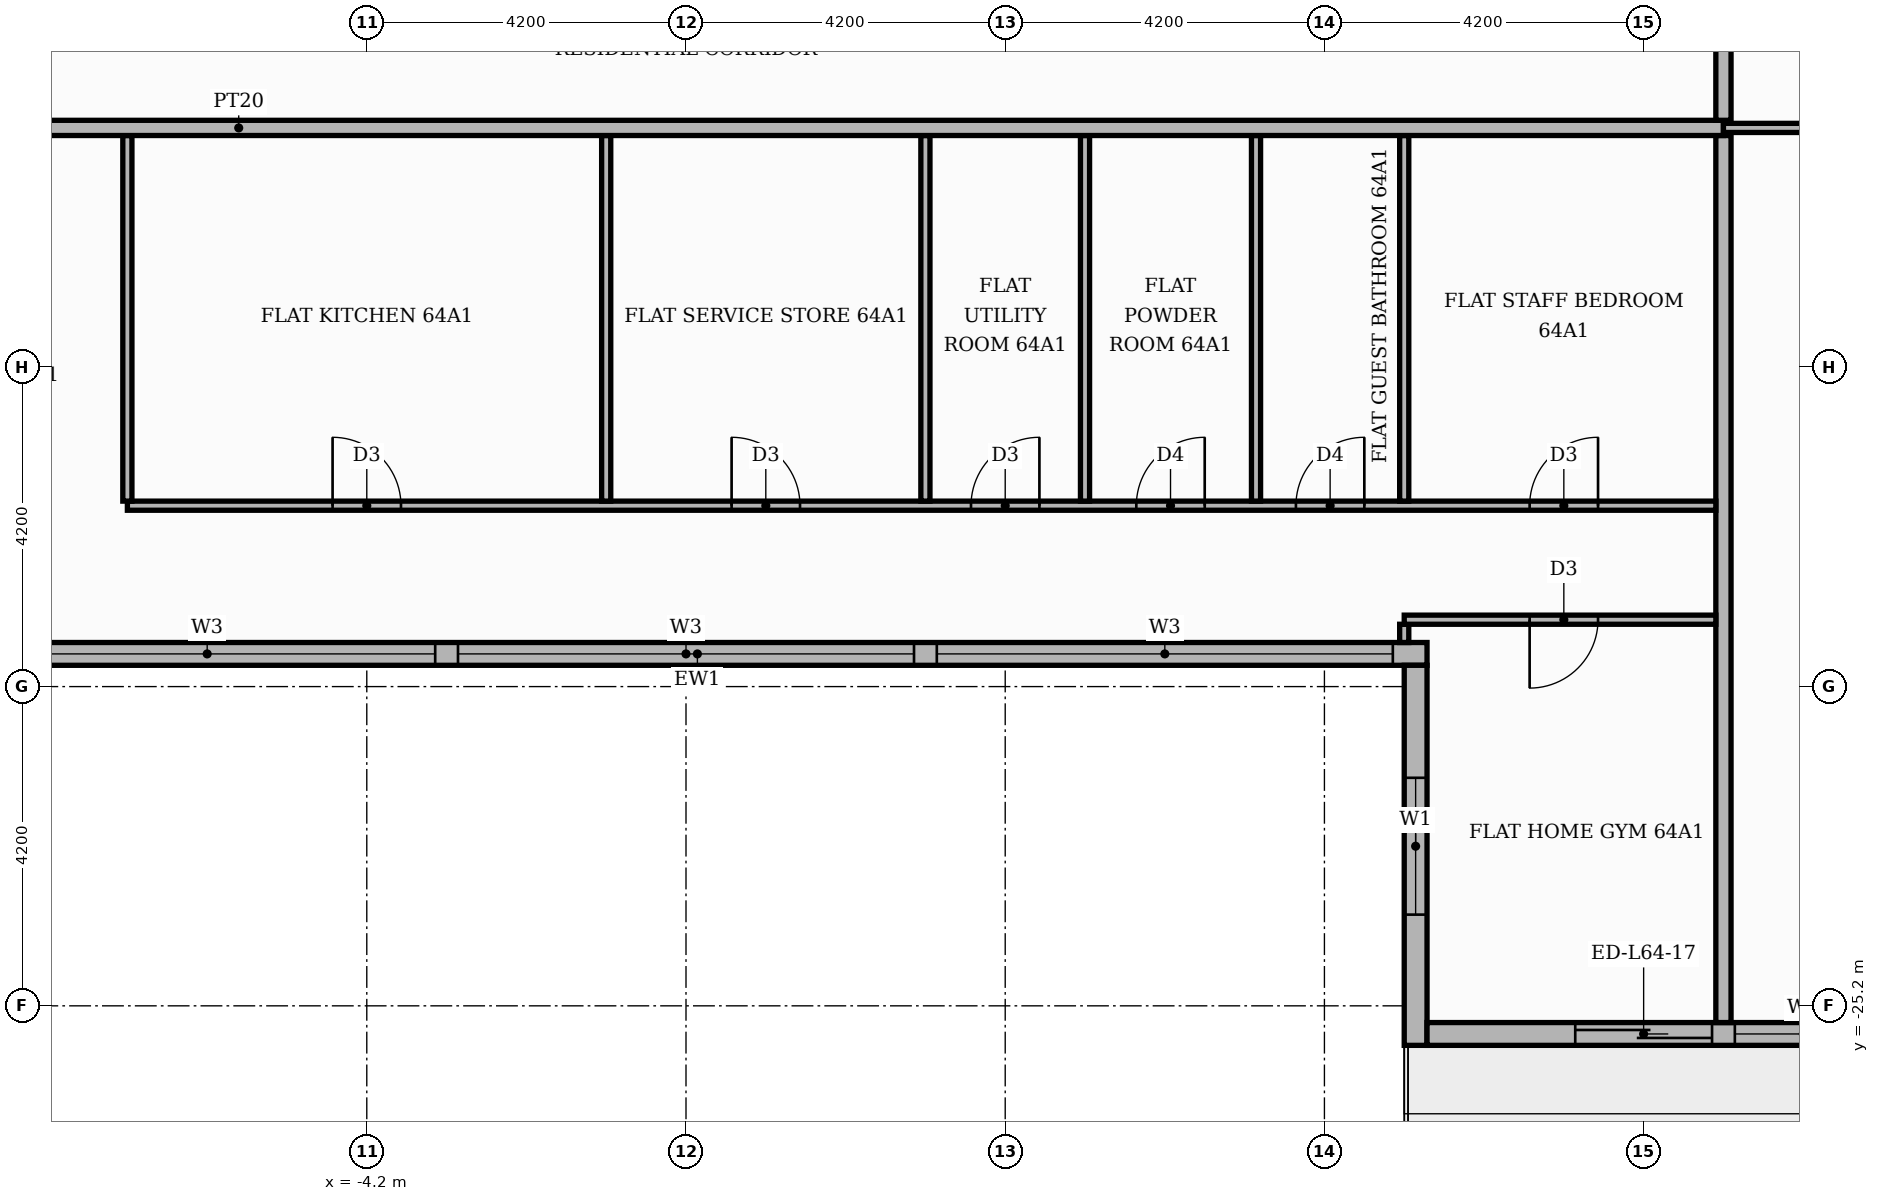
"""IFC4 building model, lengths in metres.
Left out: names, types, materials, properties, quantities, classifications, styles, units other than length and angle.
Written with IfcOpenShell. Run it as: python <this file> out.ifc"""

import sys

from ifc_helpers import new_model, si_unit, direction, frame, frame_2d, origin, place, context, subcontext, project, spatial, rectangle, extrude, element, fill, save


model = new_model("IFC4")
c1 = context("Model", 3, precision=1e-05, world=origin(), true_north=direction((0.0, 1.0)))
c2 = subcontext(c1, "Body", "Model", "MODEL_VIEW")
j1 = project(units=[si_unit("LENGTHUNIT", "METRE"), si_unit("PLANEANGLEUNIT", "RADIAN")], contexts=[c1])
p1 = place(None, origin())
s1 = spatial("IfcSite", under=j1, at=p1, CompositionType="ELEMENT")
p2 = place(p1, origin())
s2 = spatial("IfcBuilding", under=s1, at=p2, CompositionType="ELEMENT")
p3 = place(p2, frame((0.0, 0.0, 267.9)))
s3 = spatial("IfcBuildingStorey", under=s2, at=p3, CompositionType="ELEMENT", Elevation=267.9)
p4 = place(p3, frame((-9.45, -20.57, 0.0), z_axis=(0.0, 0.0, 1.0), x_axis=(1.0, 0.0, 0.0)))
e1 = element("IfcWall", 1, at=p4, inside=s3, PredefinedType="STANDARD", context=c2, shape_type="SweptSolid", body=[
    extrude(rectangle(XDim=19.2, YDim=0.3, at=frame_2d((9.6, 0.0))), origin(), (0.0, 0.0, 1.0), 3.48),
])
p5 = place(p4, frame((0.15, 0.0, 0.9)))
e2 = element("IfcOpeningElement", 2, at=p5, cuts=e1, PredefinedType="OPENING", context=c2, shape_type="SweptSolid", body=[
    extrude(rectangle(XDim=6.0, YDim=2.1, at=frame_2d((3.0, 1.05))), frame((0.0, 0.16, 0.0), z_axis=(0.0, -1.0, 0.0), x_axis=(1.0, 0.0, 0.0)), (0.0, 0.0, 1.0), 0.32),
])
p6 = place(p4, frame((6.45, 0.0, 0.9)))
e3 = element("IfcOpeningElement", 3, at=p6, cuts=e1, PredefinedType="OPENING", context=c2, shape_type="SweptSolid", body=[
    extrude(rectangle(XDim=6.0, YDim=2.1, at=frame_2d((3.0, 1.05))), frame((0.0, 0.16, 0.0), z_axis=(0.0, -1.0, 0.0), x_axis=(1.0, 0.0, 0.0)), (0.0, 0.0, 1.0), 0.32),
])
p7 = place(p4, frame((12.75, 0.0, 0.9)))
e4 = element("IfcOpeningElement", 4, at=p7, cuts=e1, PredefinedType="OPENING", context=c2, shape_type="SweptSolid", body=[
    extrude(rectangle(XDim=6.0, YDim=2.1, at=frame_2d((3.0, 1.05))), frame((0.0, 0.16, 0.0), z_axis=(0.0, -1.0, 0.0), x_axis=(1.0, 0.0, 0.0)), (0.0, 0.0, 1.0), 0.32),
])
p8 = place(p3, frame((9.6, -20.72, 0.0), z_axis=(0.0, 0.0, 1.0), x_axis=(0.0, -1.0, 0.0)))
e5 = element("IfcWall", 5, at=p8, inside=s3, PredefinedType="STANDARD", context=c2, shape_type="SweptSolid", body=[
    extrude(rectangle(XDim=5.0, YDim=0.3, at=frame_2d((2.5, 0.0))), origin(), (0.0, 0.0, 1.0), 3.48),
])
p9 = place(p8, frame((1.48, 0.0, 0.9)))
e6 = element("IfcOpeningElement", 6, at=p9, cuts=e5, PredefinedType="OPENING", context=c2, shape_type="SweptSolid", body=[
    extrude(rectangle(XDim=1.8, YDim=2.1, at=frame_2d((0.9, 1.05))), frame((0.0, 0.16, 0.0), z_axis=(0.0, -1.0, 0.0), x_axis=(1.0, 0.0, 0.0)), (0.0, 0.0, 1.0), 0.32),
])
p10 = place(p3, frame((9.75, -25.57, 0.0), z_axis=(0.0, 0.0, 1.0), x_axis=(1.0, 0.0, 0.0)))
e7 = element("IfcWall", 7, at=p10, inside=s3, PredefinedType="STANDARD", context=c2, shape_type="SweptSolid", body=[
    extrude(rectangle(XDim=6.45, YDim=0.3, at=frame_2d((3.225, 0.0))), origin(), (0.0, 0.0, 1.0), 3.48),
])
p11 = place(p10, frame((1.95, 0.0, 0.0)))
e8 = element("IfcOpeningElement", 8, at=p11, cuts=e7, PredefinedType="OPENING", context=c2, shape_type="SweptSolid", body=[
    extrude(rectangle(XDim=1.8, YDim=2.4, at=frame_2d((0.9, 1.2))), frame((0.0, 0.16, 0.0), z_axis=(0.0, -1.0, 0.0), x_axis=(1.0, 0.0, 0.0)), (0.0, 0.0, 1.0), 0.32),
])
p12 = place(p10, frame((4.05, 0.0, 0.9)))
e9 = element("IfcOpeningElement", 9, at=p12, cuts=e7, PredefinedType="OPENING", context=c2, shape_type="SweptSolid", body=[
    extrude(rectangle(XDim=1.8, YDim=2.1, at=frame_2d((0.9, 1.05))), frame((0.0, 0.16, 0.0), z_axis=(0.0, -1.0, 0.0), x_axis=(1.0, 0.0, 0.0)), (0.0, 0.0, 1.0), 0.32),
])
p13 = place(p3, frame((13.65, -25.42, 0.0), z_axis=(0.0, 0.0, 1.0), x_axis=(0.0, 1.0, 0.0)))
e10 = element("IfcWall", 10, at=p13, inside=s3, PredefinedType="PARTITIONING", context=c2, shape_type="SweptSolid", body=[
    extrude(rectangle(XDim=11.67, YDim=0.2, at=frame_2d((5.835, 0.0))), origin(), (0.0, 0.0, 1.0), 3.48),
])
p14 = place(p3, frame((9.45, -20.42, 0.0), z_axis=(0.0, 0.0, 1.0), x_axis=(0.0, 1.0, 0.0)))
e11 = element("IfcWall", 11, at=p14, inside=s3, PredefinedType="PARTITIONING", context=c2, shape_type="SweptSolid", body=[
    extrude(rectangle(XDim=0.24, YDim=0.12, at=frame_2d((0.12, 0.0))), origin(), (0.0, 0.0, 1.0), 3.48),
])
p15 = place(p3, frame((9.45, -20.12, 0.0), z_axis=(0.0, 0.0, 1.0), x_axis=(1.0, 0.0, 0.0)))
e12 = element("IfcWall", 12, at=p15, inside=s3, PredefinedType="PARTITIONING", context=c2, shape_type="SweptSolid", body=[
    extrude(rectangle(XDim=4.1, YDim=0.12, at=frame_2d((2.05, 0.0))), origin(), (0.0, 0.0, 1.0), 3.48),
])
p16 = place(p15, frame((1.65, 0.0, 0.0)))
e13 = element("IfcOpeningElement", 13, at=p16, cuts=e12, PredefinedType="OPENING", context=c2, shape_type="SweptSolid", body=[
    extrude(rectangle(XDim=0.9, YDim=2.1, at=frame_2d((0.45, 1.05))), frame((0.0, 0.07, 0.0), z_axis=(0.0, -1.0, 0.0), x_axis=(1.0, 0.0, 0.0)), (0.0, 0.0, 1.0), 0.14),
])
p17 = place(p3, frame((-7.35, -18.62, 0.0), z_axis=(0.0, 0.0, 1.0), x_axis=(1.0, 0.0, 0.0)))
e14 = element("IfcWall", 14, at=p17, inside=s3, PredefinedType="PARTITIONING", context=c2, shape_type="SweptSolid", body=[
    extrude(rectangle(XDim=20.9, YDim=0.12, at=frame_2d((10.45, 0.0))), origin(), (0.0, 0.0, 1.0), 3.48),
])
p18 = place(p17, frame((2.7, 0.0, 0.0)))
e15 = element("IfcOpeningElement", 15, at=p18, cuts=e14, PredefinedType="OPENING", context=c2, shape_type="SweptSolid", body=[
    extrude(rectangle(XDim=0.9, YDim=2.1, at=frame_2d((0.45, 1.05))), frame((0.0, 0.07, 0.0), z_axis=(0.0, -1.0, 0.0), x_axis=(1.0, 0.0, 0.0)), (0.0, 0.0, 1.0), 0.14),
])
p19 = place(p17, frame((7.95, 0.0, 0.0)))
e16 = element("IfcOpeningElement", 16, at=p19, cuts=e14, PredefinedType="OPENING", context=c2, shape_type="SweptSolid", body=[
    extrude(rectangle(XDim=0.9, YDim=2.1, at=frame_2d((0.45, 1.05))), frame((0.0, 0.07, 0.0), z_axis=(0.0, -1.0, 0.0), x_axis=(1.0, 0.0, 0.0)), (0.0, 0.0, 1.0), 0.14),
])
p20 = place(p17, frame((11.1, 0.0, 0.0)))
e17 = element("IfcOpeningElement", 17, at=p20, cuts=e14, PredefinedType="OPENING", context=c2, shape_type="SweptSolid", body=[
    extrude(rectangle(XDim=0.9, YDim=2.1, at=frame_2d((0.45, 1.05))), frame((0.0, 0.07, 0.0), z_axis=(0.0, -1.0, 0.0), x_axis=(1.0, 0.0, 0.0)), (0.0, 0.0, 1.0), 0.14),
])
p21 = place(p17, frame((13.275, 0.0, 0.0)))
e18 = element("IfcOpeningElement", 18, at=p21, cuts=e14, PredefinedType="OPENING", context=c2, shape_type="SweptSolid", body=[
    extrude(rectangle(XDim=0.9, YDim=2.1, at=frame_2d((0.45, 1.05))), frame((0.0, 0.07, 0.0), z_axis=(0.0, -1.0, 0.0), x_axis=(1.0, 0.0, 0.0)), (0.0, 0.0, 1.0), 0.14),
])
p22 = place(p17, frame((15.375, 0.0, 0.0)))
e19 = element("IfcOpeningElement", 19, at=p22, cuts=e14, PredefinedType="OPENING", context=c2, shape_type="SweptSolid", body=[
    extrude(rectangle(XDim=0.9, YDim=2.1, at=frame_2d((0.45, 1.05))), frame((0.0, 0.07, 0.0), z_axis=(0.0, -1.0, 0.0), x_axis=(1.0, 0.0, 0.0)), (0.0, 0.0, 1.0), 0.14),
])
p23 = place(p17, frame((18.45, 0.0, 0.0)))
e20 = element("IfcOpeningElement", 20, at=p23, cuts=e14, PredefinedType="OPENING", context=c2, shape_type="SweptSolid", body=[
    extrude(rectangle(XDim=0.9, YDim=2.1, at=frame_2d((0.45, 1.05))), frame((0.0, 0.07, 0.0), z_axis=(0.0, -1.0, 0.0), x_axis=(1.0, 0.0, 0.0)), (0.0, 0.0, 1.0), 0.14),
])
for number, where, z_axis, x_axis in (
    (21, (-7.35, -18.56, 0.0), (0.0, 0.0, 1.0), (0.0, 1.0, 0.0)),
    (22, (-1.05, -18.56, 0.0), (0.0, 0.0, 1.0), (0.0, 1.0, 0.0)),
    (23, (3.15, -18.56, 0.0), (0.0, 0.0, 1.0), (0.0, 1.0, 0.0)),
    (24, (5.25, -18.56, 0.0), (0.0, 0.0, 1.0), (0.0, 1.0, 0.0)),
    (25, (7.5, -18.56, 0.0), (0.0, 0.0, 1.0), (0.0, 1.0, 0.0)),
    (26, (9.45, -18.56, 0.0), (0.0, 0.0, 1.0), (0.0, 1.0, 0.0)),
):
    element("IfcWall", number, at=place(p3, frame(where, z_axis=z_axis, x_axis=x_axis)), inside=s3, PredefinedType="PARTITIONING", context=c2, shape_type="SweptSolid", body=[
        extrude(rectangle(XDim=4.81, YDim=0.12, at=frame_2d((2.405, 0.0))), origin(), (0.0, 0.0, 1.0), 3.48),
    ])
p24 = place(p3, frame((-25.42, -13.65, 0.0), z_axis=(0.0, 0.0, 1.0), x_axis=(1.0, 0.0, 0.0)))
e27 = element("IfcWall", 27, at=p24, inside=s3, PredefinedType="PARTITIONING", context=c2, shape_type="SweptSolid", body=[
    extrude(rectangle(XDim=39.07, YDim=0.2, at=frame_2d((19.535, 0.0))), origin(), (0.0, 0.0, 1.0), 3.48),
])
p25 = place(p24, frame((14.37, 0.0, 0.0)))
e28 = element("IfcOpeningElement", 28, at=p25, cuts=e27, PredefinedType="OPENING", context=c2, shape_type="SweptSolid", body=[
    extrude(rectangle(XDim=1.1, YDim=2.4, at=frame_2d((0.55, 1.2))), frame((0.0, 0.11, 0.0), z_axis=(0.0, -1.0, 0.0), x_axis=(1.0, 0.0, 0.0)), (0.0, 0.0, 1.0), 0.22),
])
p26 = place(p3, frame((13.65, -13.65, 0.0), z_axis=(0.0, 0.0, 1.0), x_axis=(1.0, 0.0, 0.0)))
e29 = element("IfcWall", 29, at=p26, inside=s3, PredefinedType="PARTITIONING", context=c2, shape_type="SweptSolid", body=[
    extrude(rectangle(XDim=6.17, YDim=0.12, at=frame_2d((3.085, 0.0))), origin(), (0.0, 0.0, 1.0), 3.48),
])
p27 = place(p26, frame((2.635, 0.0, 0.0)))
e30 = element("IfcOpeningElement", 30, at=p27, cuts=e29, PredefinedType="OPENING", context=c2, shape_type="SweptSolid", body=[
    extrude(rectangle(XDim=0.9, YDim=2.1, at=frame_2d((0.45, 1.05))), frame((0.0, 0.07, 0.0), z_axis=(0.0, -1.0, 0.0), x_axis=(1.0, 0.0, 0.0)), (0.0, 0.0, 1.0), 0.14),
])
p28 = place(p3, frame((13.65, -13.55, 0.0), z_axis=(0.0, 0.0, 1.0), x_axis=(0.0, 1.0, 0.0)))
e31 = element("IfcWall", 31, at=p28, inside=s3, PredefinedType="PARTITIONING", context=c2, shape_type="SweptSolid", body=[
    extrude(rectangle(XDim=2.45, YDim=0.2, at=frame_2d((1.225, 0.0))), origin(), (0.0, 0.0, 1.0), 3.48),
])
p29 = place(p5, origin())
e32 = element("IfcWindow", 32, at=p29, inside=s3, PartitioningType="SINGLE_PANEL", PredefinedType="WINDOW", context=c2, shape_type="SweptSolid", body=[
    extrude(rectangle(XDim=6.0, YDim=2.1, at=frame_2d((3.0, 1.05))), frame((0.0, 0.03, 0.0), z_axis=(0.0, -1.0, 0.0), x_axis=(1.0, 0.0, 0.0)), (0.0, 0.0, 1.0), 0.06),
])
fill(e2, e32)
p30 = place(p6, origin())
e33 = element("IfcWindow", 33, at=p30, inside=s3, PartitioningType="SINGLE_PANEL", PredefinedType="WINDOW", context=c2, shape_type="SweptSolid", body=[
    extrude(rectangle(XDim=6.0, YDim=2.1, at=frame_2d((3.0, 1.05))), frame((0.0, 0.03, 0.0), z_axis=(0.0, -1.0, 0.0), x_axis=(1.0, 0.0, 0.0)), (0.0, 0.0, 1.0), 0.06),
])
fill(e3, e33)
p31 = place(p7, origin())
e34 = element("IfcWindow", 34, at=p31, inside=s3, PartitioningType="SINGLE_PANEL", PredefinedType="WINDOW", context=c2, shape_type="SweptSolid", body=[
    extrude(rectangle(XDim=6.0, YDim=2.1, at=frame_2d((3.0, 1.05))), frame((0.0, 0.03, 0.0), z_axis=(0.0, -1.0, 0.0), x_axis=(1.0, 0.0, 0.0)), (0.0, 0.0, 1.0), 0.06),
])
fill(e4, e34)
p32 = place(p9, origin())
e35 = element("IfcWindow", 35, at=p32, inside=s3, PartitioningType="SINGLE_PANEL", PredefinedType="WINDOW", context=c2, shape_type="SweptSolid", body=[
    extrude(rectangle(XDim=1.8, YDim=2.1, at=frame_2d((0.9, 1.05))), frame((0.0, 0.03, 0.0), z_axis=(0.0, -1.0, 0.0), x_axis=(1.0, 0.0, 0.0)), (0.0, 0.0, 1.0), 0.06),
])
fill(e6, e35)
p33 = place(p11, origin())
e36 = element("IfcDoor", 36, at=p33, inside=s3, OperationType="SLIDING_TO_RIGHT", PredefinedType="DOOR", context=c2, shape_type="SweptSolid", body=[
    extrude(rectangle(XDim=1.8, YDim=2.4, at=frame_2d((0.9, 1.2))), frame((0.0, 0.025, 0.0), z_axis=(0.0, -1.0, 0.0), x_axis=(1.0, 0.0, 0.0)), (0.0, 0.0, 1.0), 0.05),
])
fill(e8, e36)
p34 = place(p12, origin())
e37 = element("IfcWindow", 37, at=p34, inside=s3, PartitioningType="SINGLE_PANEL", PredefinedType="WINDOW", context=c2, shape_type="SweptSolid", body=[
    extrude(rectangle(XDim=1.8, YDim=2.1, at=frame_2d((0.9, 1.05))), frame((0.0, 0.03, 0.0), z_axis=(0.0, -1.0, 0.0), x_axis=(1.0, 0.0, 0.0)), (0.0, 0.0, 1.0), 0.06),
])
fill(e9, e37)
p35 = place(p18, origin())
e38 = element("IfcDoor", 38, at=p35, inside=s3, OperationType="SINGLE_SWING_LEFT", PredefinedType="DOOR", context=c2, shape_type="SweptSolid", body=[
    extrude(rectangle(XDim=0.9, YDim=2.1, at=frame_2d((0.45, 1.05))), frame((0.0, 0.025, 0.0), z_axis=(0.0, -1.0, 0.0), x_axis=(1.0, 0.0, 0.0)), (0.0, 0.0, 1.0), 0.05),
])
fill(e15, e38)
p36 = place(p19, origin())
e39 = element("IfcDoor", 39, at=p36, inside=s3, OperationType="SINGLE_SWING_LEFT", PredefinedType="DOOR", context=c2, shape_type="SweptSolid", body=[
    extrude(rectangle(XDim=0.9, YDim=2.1, at=frame_2d((0.45, 1.05))), frame((0.0, 0.025, 0.0), z_axis=(0.0, -1.0, 0.0), x_axis=(1.0, 0.0, 0.0)), (0.0, 0.0, 1.0), 0.05),
])
fill(e16, e39)
p37 = place(p20, origin())
e40 = element("IfcDoor", 40, at=p37, inside=s3, OperationType="SINGLE_SWING_RIGHT", PredefinedType="DOOR", context=c2, shape_type="SweptSolid", body=[
    extrude(rectangle(XDim=0.9, YDim=2.1, at=frame_2d((0.45, 1.05))), frame((0.0, 0.025, 0.0), z_axis=(0.0, -1.0, 0.0), x_axis=(1.0, 0.0, 0.0)), (0.0, 0.0, 1.0), 0.05),
])
fill(e17, e40)
p38 = place(p21, origin())
e41 = element("IfcDoor", 41, at=p38, inside=s3, OperationType="SINGLE_SWING_RIGHT", PredefinedType="DOOR", context=c2, shape_type="SweptSolid", body=[
    extrude(rectangle(XDim=0.9, YDim=2.1, at=frame_2d((0.45, 1.05))), frame((0.0, 0.025, 0.0), z_axis=(0.0, -1.0, 0.0), x_axis=(1.0, 0.0, 0.0)), (0.0, 0.0, 1.0), 0.05),
])
fill(e18, e41)
p39 = place(p22, origin())
e42 = element("IfcDoor", 42, at=p39, inside=s3, OperationType="SINGLE_SWING_RIGHT", PredefinedType="DOOR", context=c2, shape_type="SweptSolid", body=[
    extrude(rectangle(XDim=0.9, YDim=2.1, at=frame_2d((0.45, 1.05))), frame((0.0, 0.025, 0.0), z_axis=(0.0, -1.0, 0.0), x_axis=(1.0, 0.0, 0.0)), (0.0, 0.0, 1.0), 0.05),
])
fill(e19, e42)
p40 = place(p23, origin())
e43 = element("IfcDoor", 43, at=p40, inside=s3, OperationType="SINGLE_SWING_RIGHT", PredefinedType="DOOR", context=c2, shape_type="SweptSolid", body=[
    extrude(rectangle(XDim=0.9, YDim=2.1, at=frame_2d((0.45, 1.05))), frame((0.0, 0.025, 0.0), z_axis=(0.0, -1.0, 0.0), x_axis=(1.0, 0.0, 0.0)), (0.0, 0.0, 1.0), 0.05),
])
fill(e20, e43)
p41 = place(p16, frame((0.9, 0.0, 0.0), z_axis=(0.0, 0.0, 1.0), x_axis=(-1.0, 0.0, 0.0)))
e44 = element("IfcDoor", 44, at=p41, inside=s3, OperationType="SINGLE_SWING_LEFT", PredefinedType="DOOR", context=c2, shape_type="SweptSolid", body=[
    extrude(rectangle(XDim=0.9, YDim=2.1, at=frame_2d((0.45, 1.05))), frame((0.0, 0.025, 0.0), z_axis=(0.0, -1.0, 0.0), x_axis=(1.0, 0.0, 0.0)), (0.0, 0.0, 1.0), 0.05),
])
fill(e13, e44)
save(model, sys.argv[1])
